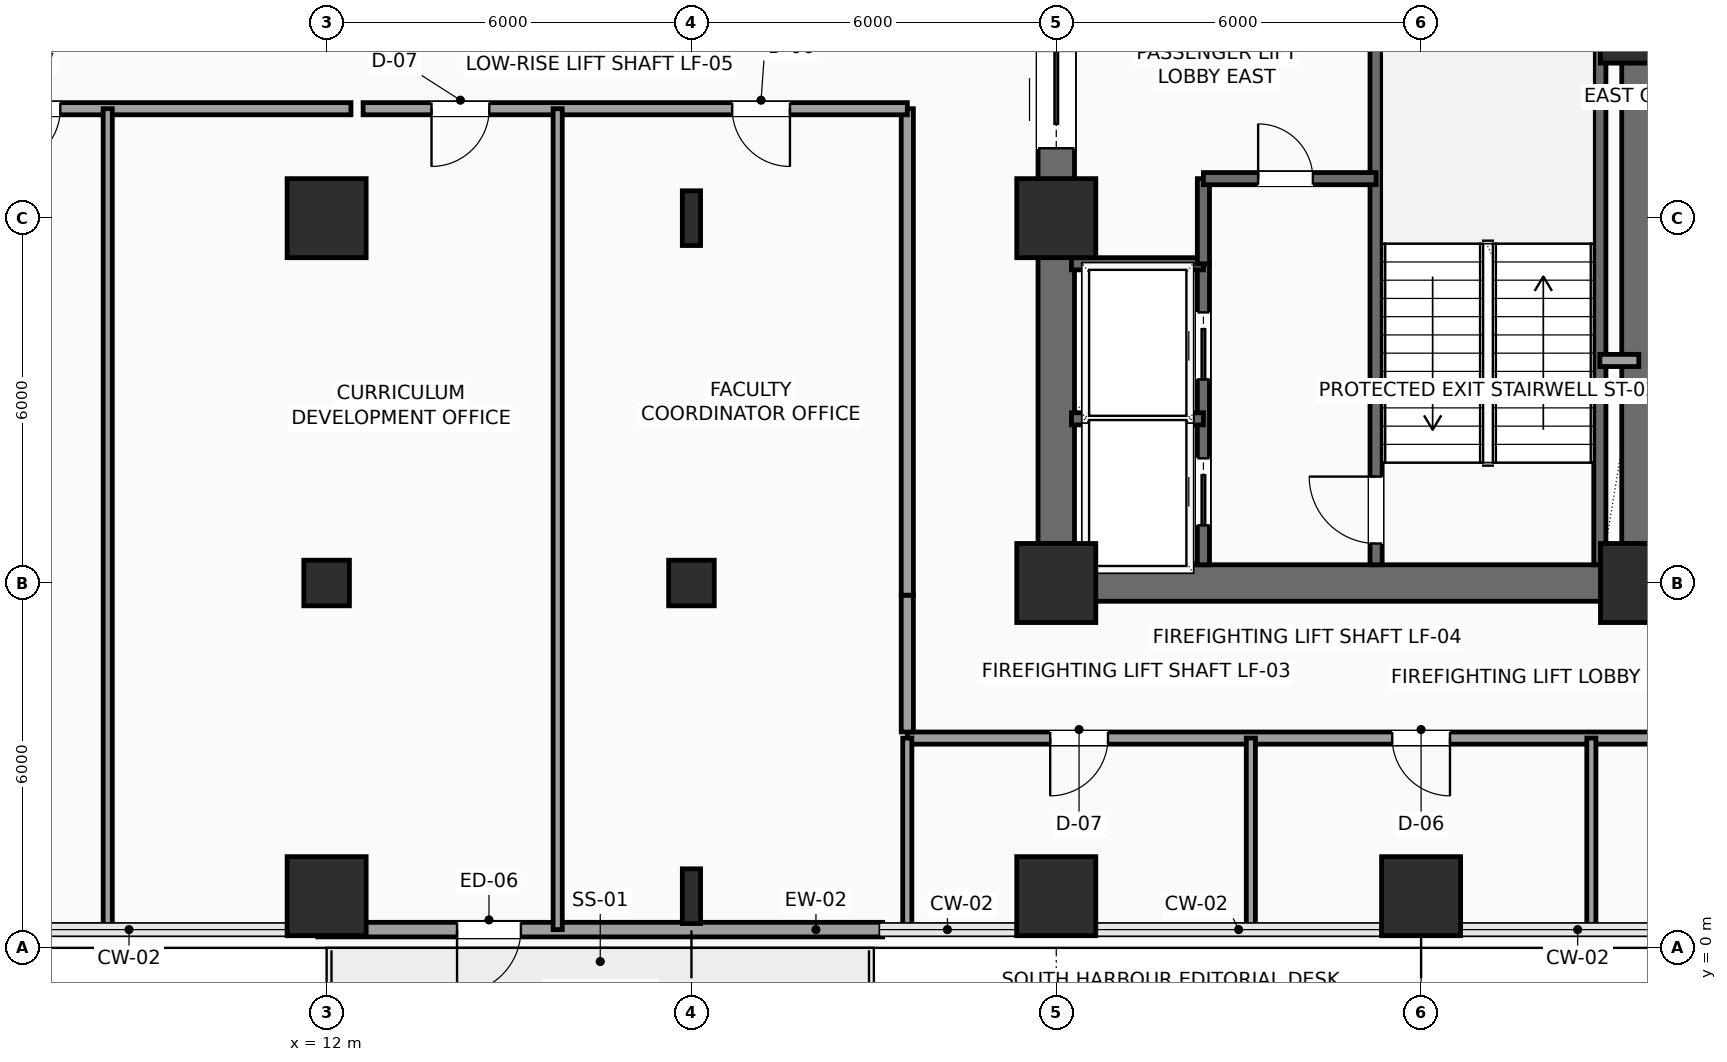
"""IFC4 building model, lengths in metres.
Left out: names, types, materials, properties, quantities, classifications, styles, units other than length and angle.
Written with IfcOpenShell. Run it as: python <this file> out.ifc"""

import sys

from ifc_helpers import new_model, si_unit, direction, frame, frame_2d, origin, origin_2d, place, context, subcontext, project, spatial, rectangle, hollow_rectangle, i_section, extrude, element, fill, save


model = new_model("IFC4")
c1 = context("Model", 3, precision=1e-05, world=origin(), true_north=direction((0.0, 1.0)))
c2 = subcontext(c1, "Body", "Model", "MODEL_VIEW")
j1 = project(units=[si_unit("LENGTHUNIT", "METRE"), si_unit("PLANEANGLEUNIT", "RADIAN")], contexts=[c1])
p1 = place(None, origin())
s1 = spatial("IfcSite", under=j1, at=p1, CompositionType="ELEMENT")
p2 = place(p1, origin())
s2 = spatial("IfcBuilding", under=s1, at=p2, CompositionType="ELEMENT")
p3 = place(p2, frame((0.0, 0.0, 63.6)))
s3 = spatial("IfcBuildingStorey", under=s2, at=p3, CompositionType="ELEMENT", Elevation=63.6)
for number, where, z_axis, x_axis in (
    (1, (24.0, 6.0, 0.0), (0.0, 0.0, 1.0), (1.0, 0.0, 0.0)),
    (2, (24.0, 12.0, 0.0), (0.0, 0.0, 1.0), (1.0, 0.0, 0.0)),
    (3, (33.6, 6.0, 0.0), (0.0, 0.0, 1.0), (1.0, 0.0, 0.0)),
    (4, (33.6, 15.2, 0.0), (0.0, 0.0, 1.0), (1.0, 0.0, 0.0)),
    (5, (12.0, 0.85, 0.0), (0.0, 0.0, 1.0), (1.0, 0.0, 0.0)),
):
    element("IfcColumn", number, at=place(p3, frame(where, z_axis=z_axis, x_axis=x_axis)), inside=s3, PredefinedType="COLUMN", context=c2, shape_type="SweptSolid", body=[
        extrude(rectangle(XDim=1.3, YDim=1.3, at=origin_2d()), origin(), (0.0, 0.0, 1.0), 3.9),
    ])
p4 = place(p3, frame((12.0, 6.0, 0.0), z_axis=(0.0, 0.0, 1.0), x_axis=(1.0, 0.0, 0.0)))
e6 = element("IfcColumn", 6, at=p4, inside=s3, PredefinedType="COLUMN", context=c2, shape_type="SweptSolid", body=[
    extrude(hollow_rectangle(XDim=0.75, YDim=0.75, WallThickness=0.035, InnerFilletRadius=0.035, OuterFilletRadius=0.05, at=origin_2d()), origin(), (0.0, 0.0, 1.0), 3.9),
])
p5 = place(p3, frame((12.0, 12.0, 0.0), z_axis=(0.0, 0.0, 1.0), x_axis=(1.0, 0.0, 0.0)))
e7 = element("IfcColumn", 7, at=p5, inside=s3, PredefinedType="COLUMN", context=c2, shape_type="SweptSolid", body=[
    extrude(rectangle(XDim=1.3, YDim=1.3, at=origin_2d()), origin(), (0.0, 0.0, 1.0), 3.9),
])
p6 = place(p3, frame((18.0, 0.85, 0.0), z_axis=(0.0, 0.0, 1.0), x_axis=(1.0, 0.0, 0.0)))
e8 = element("IfcColumn", 8, at=p6, inside=s3, PredefinedType="COLUMN", context=c2, shape_type="SweptSolid", body=[
    extrude(i_section(OverallWidth=0.3, OverallDepth=0.9, WebThickness=0.019, FlangeThickness=0.035, FilletRadius=0.03, at=origin_2d()), origin(), (0.0, 0.0, 1.0), 3.9),
])
p7 = place(p3, frame((18.0, 6.0, 0.0), z_axis=(0.0, 0.0, 1.0), x_axis=(1.0, 0.0, 0.0)))
e9 = element("IfcColumn", 9, at=p7, inside=s3, PredefinedType="COLUMN", context=c2, shape_type="SweptSolid", body=[
    extrude(hollow_rectangle(XDim=0.75, YDim=0.75, WallThickness=0.035, InnerFilletRadius=0.035, OuterFilletRadius=0.05, at=origin_2d()), origin(), (0.0, 0.0, 1.0), 3.9),
])
p8 = place(p3, frame((18.0, 12.0, 0.0), z_axis=(0.0, 0.0, 1.0), x_axis=(1.0, 0.0, 0.0)))
e10 = element("IfcColumn", 10, at=p8, inside=s3, PredefinedType="COLUMN", context=c2, shape_type="SweptSolid", body=[
    extrude(i_section(OverallWidth=0.3, OverallDepth=0.9, WebThickness=0.019, FlangeThickness=0.035, FilletRadius=0.03, at=origin_2d()), origin(), (0.0, 0.0, 1.0), 3.9),
])
for number, where, z_axis, x_axis in (
    (11, (24.0, 0.85, 0.0), (0.0, 0.0, 1.0), (1.0, 0.0, 0.0)),
    (12, (30.0, 0.85, 0.0), (0.0, 0.0, 1.0), (1.0, 0.0, 0.0)),
):
    element("IfcColumn", number, at=place(p3, frame(where, z_axis=z_axis, x_axis=x_axis)), inside=s3, PredefinedType="COLUMN", context=c2, shape_type="SweptSolid", body=[
        extrude(rectangle(XDim=1.3, YDim=1.3, at=origin_2d()), origin(), (0.0, 0.0, 1.0), 3.9),
    ])
p9 = place(p3, frame((21.145, 0.3, 0.0), z_axis=(0.0, 0.0, 1.0), x_axis=(-1.0, 0.0, 0.0)))
e13 = element("IfcWall", 13, at=p9, inside=s3, PredefinedType="SOLIDWALL", context=c2, shape_type="SweptSolid", body=[
    extrude(rectangle(XDim=9.29, YDim=0.24, at=frame_2d((4.645, 0.0))), origin(), (0.0, 0.0, 1.0), 3.65),
])
p10 = place(p9, frame((5.95, 0.0, 0.0)))
e14 = element("IfcOpeningElement", 14, at=p10, cuts=e13, PredefinedType="OPENING", context=c2, shape_type="SweptSolid", body=[
    extrude(rectangle(XDim=1.05, YDim=2.2, at=frame_2d((0.525, 1.1))), frame((0.0, 0.13, 0.0), z_axis=(0.0, -1.0, 0.0), x_axis=(1.0, 0.0, 0.0)), (0.0, 0.0, 1.0), 0.26),
])
p11 = place(p3, frame((24.0, 6.0, 0.0), z_axis=(0.0, 0.0, 1.0), x_axis=(1.0, 0.0, 0.0)))
e15 = element("IfcWall", 15, at=p11, inside=s3, PredefinedType="SHEAR", context=c2, shape_type="SweptSolid", body=[
    extrude(rectangle(XDim=9.6, YDim=0.6, at=frame_2d((4.8, 0.0))), origin(), (0.0, 0.0, 1.0), 3.65),
])
p12 = place(p3, frame((24.0, 6.0, 0.0), z_axis=(0.0, 0.0, 1.0), x_axis=(0.0, 1.0, 0.0)))
e16 = element("IfcWall", 16, at=p12, inside=s3, PredefinedType="SHEAR", context=c2, shape_type="SweptSolid", body=[
    extrude(rectangle(XDim=12.0, YDim=0.6, at=frame_2d((6.0, 0.0))), origin(), (0.0, 0.0, 1.0), 3.65),
])
p13 = place(p12, frame((7.15, 0.0, 0.0)))
e17 = element("IfcOpeningElement", 17, at=p13, cuts=e16, PredefinedType="OPENING", context=c2, shape_type="SweptSolid", body=[
    extrude(rectangle(XDim=1.6, YDim=2.3, at=frame_2d((0.8, 1.15))), frame((0.0, 0.31, 0.0), z_axis=(0.0, -1.0, 0.0), x_axis=(1.0, 0.0, 0.0)), (0.0, 0.0, 1.0), 0.62),
])
p14 = place(p3, frame((33.6, 6.0, 0.0), z_axis=(0.0, 0.0, 1.0), x_axis=(0.0, 1.0, 0.0)))
e18 = element("IfcWall", 18, at=p14, inside=s3, PredefinedType="SHEAR", context=c2, shape_type="SweptSolid", body=[
    extrude(rectangle(XDim=12.0, YDim=0.6, at=frame_2d((6.0, 0.0))), origin(), (0.0, 0.0, 1.0), 3.65),
])
p15 = place(p14, frame((10.2, 0.0, 0.0)))
e19 = element("IfcOpeningElement", 19, at=p15, cuts=e18, PredefinedType="OPENING", context=c2, shape_type="SweptSolid", body=[
    extrude(rectangle(XDim=0.9, YDim=2.15, at=frame_2d((0.45, 1.075))), frame((0.0, 0.31, 0.0), z_axis=(0.0, -1.0, 0.0), x_axis=(1.0, 0.0, 0.0)), (0.0, 0.0, 1.0), 0.62),
])
p16 = place(p3, frame((29.26, 6.3, 0.0), z_axis=(0.0, 0.0, 1.0), x_axis=(0.0, 1.0, 0.0)))
e20 = element("IfcWall", 20, at=p16, inside=s3, PredefinedType="SHEAR", context=c2, shape_type="SweptSolid", body=[
    extrude(rectangle(XDim=8.88, YDim=0.2, at=frame_2d((4.44, 0.0))), origin(), (0.0, 0.0, 1.0), 3.65),
])
p17 = place(p16, frame((0.35, 0.0, 0.0)))
e21 = element("IfcOpeningElement", 21, at=p17, cuts=e20, PredefinedType="OPENING", context=c2, shape_type="SweptSolid", body=[
    extrude(rectangle(XDim=1.1, YDim=2.2, at=frame_2d((0.55, 1.1))), frame((0.0, 0.11, 0.0), z_axis=(0.0, -1.0, 0.0), x_axis=(1.0, 0.0, 0.0)), (0.0, 0.0, 1.0), 0.22),
])
p18 = place(p3, frame((32.94, 6.3, 0.0), z_axis=(0.0, 0.0, 1.0), x_axis=(0.0, 1.0, 0.0)))
e22 = element("IfcWall", 22, at=p18, inside=s3, PredefinedType="SHEAR", context=c2, shape_type="SweptSolid", body=[
    extrude(rectangle(XDim=8.88, YDim=0.2, at=frame_2d((4.44, 0.0))), origin(), (0.0, 0.0, 1.0), 3.65),
])
p19 = place(p3, frame((26.42, 6.3, 0.0), z_axis=(0.0, 0.0, 1.0), x_axis=(0.0, 1.0, 0.0)))
e23 = element("IfcWall", 23, at=p19, inside=s3, PredefinedType="SHEAR", context=c2, shape_type="SweptSolid", body=[
    extrude(rectangle(XDim=4.95, YDim=0.2, at=frame_2d((2.475, 0.0))), origin(), (0.0, 0.0, 1.0), 3.65),
])
p20 = place(p19, frame((0.65, 0.0, 0.0)))
e24 = element("IfcOpeningElement", 24, at=p20, cuts=e23, PredefinedType="OPENING", context=c2, shape_type="SweptSolid", body=[
    extrude(rectangle(XDim=1.1, YDim=2.2, at=frame_2d((0.55, 1.1))), frame((0.0, 0.11, 0.0), z_axis=(0.0, -1.0, 0.0), x_axis=(1.0, 0.0, 0.0)), (0.0, 0.0, 1.0), 0.22),
])
p21 = place(p19, frame((3.05, 0.0, 0.0)))
e25 = element("IfcOpeningElement", 25, at=p21, cuts=e23, PredefinedType="OPENING", context=c2, shape_type="SweptSolid", body=[
    extrude(rectangle(XDim=1.1, YDim=2.2, at=frame_2d((0.55, 1.1))), frame((0.0, 0.11, 0.0), z_axis=(0.0, -1.0, 0.0), x_axis=(1.0, 0.0, 0.0)), (0.0, 0.0, 1.0), 0.22),
])
for number, where, z_axis, x_axis in (
    (26, (24.25, 8.7, 0.0), (0.0, 0.0, 1.0), (1.0, 0.0, 0.0)),
    (27, (24.25, 11.25, 0.0), (0.0, 0.0, 1.0), (1.0, 0.0, 0.0)),
):
    element("IfcWall", number, at=place(p3, frame(where, z_axis=z_axis, x_axis=x_axis)), inside=s3, PredefinedType="SHEAR", context=c2, shape_type="SweptSolid", body=[
        extrude(rectangle(XDim=2.17, YDim=0.2, at=frame_2d((1.085, 0.0))), origin(), (0.0, 0.0, 1.0), 3.65),
    ])
p22 = place(p3, frame((26.42, 11.25, 0.0), z_axis=(0.0, 0.0, 1.0), x_axis=(0.0, 1.0, 0.0)))
e28 = element("IfcWall", 28, at=p22, inside=s3, PredefinedType="SHEAR", context=c2, shape_type="SweptSolid", body=[
    extrude(rectangle(XDim=1.4, YDim=0.2, at=frame_2d((0.7, 0.0))), origin(), (0.0, 0.0, 1.0), 3.65),
])
p23 = place(p3, frame((26.42, 12.65, 0.0), z_axis=(0.0, 0.0, 1.0), x_axis=(1.0, 0.0, 0.0)))
e29 = element("IfcWall", 29, at=p23, inside=s3, PredefinedType="SHEAR", context=c2, shape_type="SweptSolid", body=[
    extrude(rectangle(XDim=2.84, YDim=0.2, at=frame_2d((1.42, 0.0))), origin(), (0.0, 0.0, 1.0), 3.65),
])
p24 = place(p23, frame((0.9, 0.0, 0.0)))
e30 = element("IfcOpeningElement", 30, at=p24, cuts=e29, PredefinedType="OPENING", context=c2, shape_type="SweptSolid", body=[
    extrude(rectangle(XDim=0.9, YDim=2.15, at=frame_2d((0.45, 1.075))), frame((0.0, 0.11, 0.0), z_axis=(0.0, -1.0, 0.0), x_axis=(1.0, 0.0, 0.0)), (0.0, 0.0, 1.0), 0.22),
])
p25 = place(p3, frame((32.94, 9.66, 0.0), z_axis=(0.0, 0.0, 1.0), x_axis=(1.0, 0.0, 0.0)))
e31 = element("IfcWall", 31, at=p25, inside=s3, PredefinedType="SOLIDWALL", context=c2, shape_type="SweptSolid", body=[
    extrude(rectangle(XDim=0.64, YDim=0.2, at=frame_2d((0.32, 0.0))), origin(), (0.0, 0.0, 1.0), 3.65),
])
p26 = place(p3, frame((36.15, 3.45, 0.0), z_axis=(0.0, 0.0, 1.0), x_axis=(-1.0, 0.0, 0.0)))
e32 = element("IfcWall", 32, at=p26, inside=s3, PredefinedType="SOLIDWALL", context=c2, shape_type="SweptSolid", body=[
    extrude(rectangle(XDim=14.6, YDim=0.2, at=frame_2d((7.3, 0.0))), origin(), (0.0, 0.0, 1.0), 3.142),
])
p27 = place(p26, frame((11.3, 0.0, 0.0)))
e33 = element("IfcOpeningElement", 33, at=p27, cuts=e32, PredefinedType="OPENING", context=c2, shape_type="SweptSolid", body=[
    extrude(rectangle(XDim=0.95, YDim=2.15, at=frame_2d((0.475, 1.075))), frame((0.0, 0.11, 0.0), z_axis=(0.0, -1.0, 0.0), x_axis=(1.0, 0.0, 0.0)), (0.0, 0.0, 1.0), 0.22),
])
p28 = place(p26, frame((5.675, 0.0, 0.0)))
e34 = element("IfcOpeningElement", 34, at=p28, cuts=e32, PredefinedType="OPENING", context=c2, shape_type="SweptSolid", body=[
    extrude(rectangle(XDim=0.95, YDim=2.15, at=frame_2d((0.475, 1.075))), frame((0.0, 0.11, 0.0), z_axis=(0.0, -1.0, 0.0), x_axis=(1.0, 0.0, 0.0)), (0.0, 0.0, 1.0), 0.22),
])
p29 = place(p3, frame((21.55, 3.55, 0.0), z_axis=(0.0, 0.0, 1.0), x_axis=(0.0, 1.0, 0.0)))
e35 = element("IfcWall", 35, at=p29, inside=s3, PredefinedType="SOLIDWALL", context=c2, shape_type="SweptSolid", body=[
    extrude(rectangle(XDim=2.25, YDim=0.2, at=frame_2d((1.125, 0.0))), origin(), (0.0, 0.0, 1.0), 3.65),
])
p30 = place(p3, frame((21.55, 5.8, 0.0), z_axis=(0.0, 0.0, 1.0), x_axis=(0.0, 1.0, 0.0)))
e36 = element("IfcWall", 36, at=p30, inside=s3, PredefinedType="SOLIDWALL", context=c2, shape_type="SweptSolid", body=[
    extrude(rectangle(XDim=8.0, YDim=0.2, at=frame_2d((4.0, 0.0))), origin(), (0.0, 0.0, 1.0), 3.65),
])
p31 = place(p3, frame((21.55, 13.8, 0.0), z_axis=(0.0, 0.0, 1.0), x_axis=(-1.0, 0.0, 0.0)))
e37 = element("IfcWall", 37, at=p31, inside=s3, PredefinedType="SOLIDWALL", context=c2, shape_type="SweptSolid", body=[
    extrude(rectangle(XDim=8.95, YDim=0.2, at=frame_2d((4.475, 0.0))), origin(), (0.0, 0.0, 1.0), 3.65),
])
p32 = place(p31, frame((6.875, 0.0, 0.0)))
e38 = element("IfcOpeningElement", 38, at=p32, cuts=e37, PredefinedType="OPENING", context=c2, shape_type="SweptSolid", body=[
    extrude(rectangle(XDim=0.95, YDim=2.15, at=frame_2d((0.475, 1.075))), frame((0.0, 0.11, 0.0), z_axis=(0.0, -1.0, 0.0), x_axis=(1.0, 0.0, 0.0)), (0.0, 0.0, 1.0), 0.22),
])
p33 = place(p31, frame((1.93, 0.0, 0.0)))
e39 = element("IfcOpeningElement", 39, at=p33, cuts=e37, PredefinedType="OPENING", context=c2, shape_type="SweptSolid", body=[
    extrude(rectangle(XDim=0.95, YDim=2.15, at=frame_2d((0.475, 1.075))), frame((0.0, 0.11, 0.0), z_axis=(0.0, -1.0, 0.0), x_axis=(1.0, 0.0, 0.0)), (0.0, 0.0, 1.0), 0.22),
])
p34 = place(p3, frame((12.4, 13.8, 0.0), z_axis=(0.0, 0.0, 1.0), x_axis=(-1.0, 0.0, 0.0)))
e40 = element("IfcWall", 40, at=p34, inside=s3, PredefinedType="SOLIDWALL", context=c2, shape_type="SweptSolid", body=[
    extrude(rectangle(XDim=7.15, YDim=0.2, at=frame_2d((3.575, 0.0))), origin(), (0.0, 0.0, 1.0), 3.65),
])
p35 = place(p34, frame((4.78, 0.0, 0.0)))
e41 = element("IfcOpeningElement", 41, at=p35, cuts=e40, PredefinedType="OPENING", context=c2, shape_type="SweptSolid", body=[
    extrude(rectangle(XDim=0.95, YDim=2.15, at=frame_2d((0.475, 1.075))), frame((0.0, 0.11, 0.0), z_axis=(0.0, -1.0, 0.0), x_axis=(1.0, 0.0, 0.0)), (0.0, 0.0, 1.0), 0.22),
])
p36 = place(p3, frame((6.215, 0.314, 0.0), z_axis=(0.0, 0.0, 1.0), x_axis=(0.99998042128, -0.006257559905, 0.0)))
e42 = element("IfcWall", 42, at=p36, inside=s3, PredefinedType="PARTITIONING", context=c2, shape_type="SweptSolid", body=[
    extrude(rectangle(XDim=2.185, YDim=0.15, at=frame_2d((1.092, 0.0))), origin(), (0.0, 0.0, 1.0), 3.65),
])
for number, where, z_axis, x_axis in (
    (43, (8.4, 0.3, 0.0), (0.0, 0.0, 1.0), (0.0, 1.0, 0.0)),
    (44, (15.8, 0.3, 0.0), (0.0, 0.0, 1.0), (0.0, 1.0, 0.0)),
):
    element("IfcWall", number, at=place(p3, frame(where, z_axis=z_axis, x_axis=x_axis)), inside=s3, PredefinedType="PARTITIONING", context=c2, shape_type="SweptSolid", body=[
        extrude(rectangle(XDim=13.5, YDim=0.15, at=frame_2d((6.75, 0.0))), origin(), (0.0, 0.0, 1.0), 3.65),
    ])
for number, where, z_axis, x_axis in (
    (45, (21.55, 0.3, 0.0), (0.0, 0.0, 1.0), (0.0, 1.0, 0.0)),
    (46, (27.2, 0.3, 0.0), (0.0, 0.0, 1.0), (0.0, 1.0, 0.0)),
    (47, (32.8, 0.3, 0.0), (0.0, 0.0, 1.0), (0.0, 1.0, 0.0)),
):
    element("IfcWall", number, at=place(p3, frame(where, z_axis=z_axis, x_axis=x_axis)), inside=s3, PredefinedType="PARTITIONING", context=c2, shape_type="SweptSolid", body=[
        extrude(rectangle(XDim=3.15, YDim=0.15, at=frame_2d((1.575, 0.0))), origin(), (0.0, 0.0, 1.0), 3.65),
    ])
p37 = place(p3, frame((33.65, 5.8, 0.0), z_axis=(0.0, 0.0, 1.0), x_axis=(1.0, 0.0, 0.0)))
e48 = element("IfcWall", 48, at=p37, inside=s3, PredefinedType="PARTITIONING", context=c2, shape_type="SweptSolid", body=[
    extrude(rectangle(XDim=2.5, YDim=0.15, at=frame_2d((1.25, 0.0))), origin(), (0.0, 0.0, 1.0), 2.992),
])
p38 = place(p10, origin())
e49 = element("IfcDoor", 49, at=p38, inside=s3, OperationType="SINGLE_SWING_RIGHT", PredefinedType="DOOR", context=c2, shape_type="SweptSolid", body=[
    extrude(rectangle(XDim=1.05, YDim=2.2, at=frame_2d((0.525, 1.1))), frame((0.0, 0.025, 0.0), z_axis=(0.0, -1.0, 0.0), x_axis=(1.0, 0.0, 0.0)), (0.0, 0.0, 1.0), 0.05),
])
fill(e14, e49)
p39 = place(p13, origin())
e50 = element("IfcDoor", 50, at=p39, inside=s3, OperationType="DOUBLE_DOOR_SLIDING", PredefinedType="DOOR", context=c2, shape_type="SweptSolid", body=[
    extrude(rectangle(XDim=1.6, YDim=2.3, at=frame_2d((0.8, 1.15))), frame((0.0, 0.025, 0.0), z_axis=(0.0, -1.0, 0.0), x_axis=(1.0, 0.0, 0.0)), (0.0, 0.0, 1.0), 0.05),
])
fill(e17, e50)
p40 = place(p17, origin())
e51 = element("IfcDoor", 51, at=p40, inside=s3, OperationType="SINGLE_SWING_RIGHT", PredefinedType="DOOR", context=c2, shape_type="SweptSolid", body=[
    extrude(rectangle(XDim=1.1, YDim=2.2, at=frame_2d((0.55, 1.1))), frame((0.0, 0.025, 0.0), z_axis=(0.0, -1.0, 0.0), x_axis=(1.0, 0.0, 0.0)), (0.0, 0.0, 1.0), 0.05),
])
fill(e21, e51)
p41 = place(p20, origin())
e52 = element("IfcDoor", 52, at=p41, inside=s3, OperationType="SLIDING_TO_LEFT", PredefinedType="DOOR", context=c2, shape_type="SweptSolid", body=[
    extrude(rectangle(XDim=1.1, YDim=2.2, at=frame_2d((0.55, 1.1))), frame((0.0, 0.025, 0.0), z_axis=(0.0, -1.0, 0.0), x_axis=(1.0, 0.0, 0.0)), (0.0, 0.0, 1.0), 0.05),
])
fill(e24, e52)
p42 = place(p21, origin())
e53 = element("IfcDoor", 53, at=p42, inside=s3, OperationType="SLIDING_TO_LEFT", PredefinedType="DOOR", context=c2, shape_type="SweptSolid", body=[
    extrude(rectangle(XDim=1.1, YDim=2.2, at=frame_2d((0.55, 1.1))), frame((0.0, 0.025, 0.0), z_axis=(0.0, -1.0, 0.0), x_axis=(1.0, 0.0, 0.0)), (0.0, 0.0, 1.0), 0.05),
])
fill(e25, e53)
p43 = place(p24, origin())
e54 = element("IfcDoor", 54, at=p43, inside=s3, OperationType="SINGLE_SWING_LEFT", PredefinedType="DOOR", context=c2, shape_type="SweptSolid", body=[
    extrude(rectangle(XDim=0.9, YDim=2.15, at=frame_2d((0.45, 1.075))), frame((0.0, 0.025, 0.0), z_axis=(0.0, -1.0, 0.0), x_axis=(1.0, 0.0, 0.0)), (0.0, 0.0, 1.0), 0.05),
])
fill(e30, e54)
p44 = place(p27, origin())
e55 = element("IfcDoor", 55, at=p44, inside=s3, OperationType="SINGLE_SWING_RIGHT", PredefinedType="DOOR", context=c2, shape_type="SweptSolid", body=[
    extrude(rectangle(XDim=0.95, YDim=2.15, at=frame_2d((0.475, 1.075))), frame((0.0, 0.025, 0.0), z_axis=(0.0, -1.0, 0.0), x_axis=(1.0, 0.0, 0.0)), (0.0, 0.0, 1.0), 0.05),
])
fill(e33, e55)
p45 = place(p28, origin())
e56 = element("IfcDoor", 56, at=p45, inside=s3, OperationType="SINGLE_SWING_LEFT", PredefinedType="DOOR", context=c2, shape_type="SweptSolid", body=[
    extrude(rectangle(XDim=0.95, YDim=2.15, at=frame_2d((0.475, 1.075))), frame((0.0, 0.025, 0.0), z_axis=(0.0, -1.0, 0.0), x_axis=(1.0, 0.0, 0.0)), (0.0, 0.0, 1.0), 0.05),
])
fill(e34, e56)
p46 = place(p32, origin())
e57 = element("IfcDoor", 57, at=p46, inside=s3, OperationType="SINGLE_SWING_RIGHT", PredefinedType="DOOR", context=c2, shape_type="SweptSolid", body=[
    extrude(rectangle(XDim=0.95, YDim=2.15, at=frame_2d((0.475, 1.075))), frame((0.0, 0.025, 0.0), z_axis=(0.0, -1.0, 0.0), x_axis=(1.0, 0.0, 0.0)), (0.0, 0.0, 1.0), 0.05),
])
fill(e38, e57)
p47 = place(p33, origin())
e58 = element("IfcDoor", 58, at=p47, inside=s3, OperationType="SINGLE_SWING_LEFT", PredefinedType="DOOR", context=c2, shape_type="SweptSolid", body=[
    extrude(rectangle(XDim=0.95, YDim=2.15, at=frame_2d((0.475, 1.075))), frame((0.0, 0.025, 0.0), z_axis=(0.0, -1.0, 0.0), x_axis=(1.0, 0.0, 0.0)), (0.0, 0.0, 1.0), 0.05),
])
fill(e39, e58)
p48 = place(p35, origin())
e59 = element("IfcDoor", 59, at=p48, inside=s3, OperationType="SINGLE_SWING_RIGHT", PredefinedType="DOOR", context=c2, shape_type="SweptSolid", body=[
    extrude(rectangle(XDim=0.95, YDim=2.15, at=frame_2d((0.475, 1.075))), frame((0.0, 0.025, 0.0), z_axis=(0.0, -1.0, 0.0), x_axis=(1.0, 0.0, 0.0)), (0.0, 0.0, 1.0), 0.05),
])
fill(e41, e59)
save(model, sys.argv[1])
